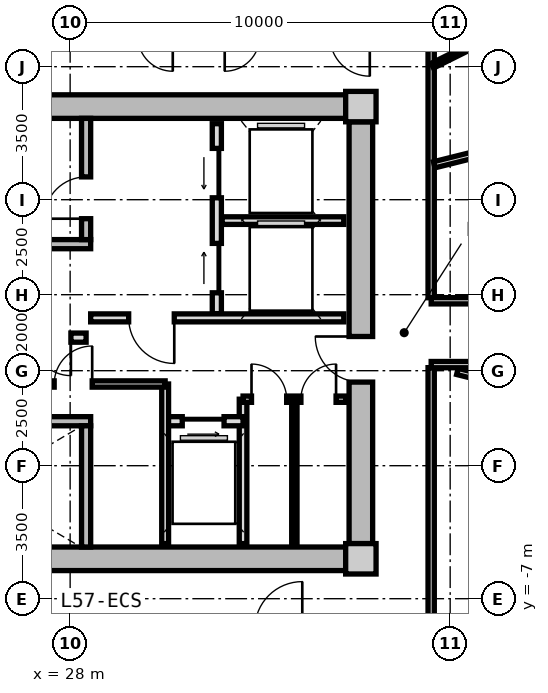
"""IFC4 building model, lengths in metres.
Left out: names, types, materials, properties, quantities, classifications, styles, units other than length and angle.
Written with IfcOpenShell. Run it as: python <this file> out.ifc"""

import sys

from ifc_helpers import new_model, si_unit, direction, frame, frame_2d, origin, origin_2d, place, context, subcontext, project, spatial, rectangle, extrude, source, transform, mapped, element, fill, save


model = new_model("IFC4")
c1 = context("Model", 3, precision=1e-05, world=origin(), true_north=direction((0.0, 1.0)))
c2 = subcontext(c1, "Body", "Model", "MODEL_VIEW")
j1 = project(units=[si_unit("LENGTHUNIT", "METRE"), si_unit("PLANEANGLEUNIT", "RADIAN")], contexts=[c1])
p1 = place(None, origin())
s1 = spatial("IfcSite", under=j1, at=p1, CompositionType="ELEMENT")
p2 = place(p1, origin())
s2 = spatial("IfcBuilding", under=s1, at=p2, CompositionType="ELEMENT")
p3 = place(p2, frame((0.0, 0.0, 183.1)))
s3 = spatial("IfcBuildingStorey", under=s2, at=p3, CompositionType="ELEMENT", Elevation=183.1)
m1 = source(origin(), c2, "Body", "SweptSolid", [
    extrude(rectangle(XDim=0.8, YDim=0.8, at=origin_2d()), origin(), (0.0, 0.0, 1.0), 3.05),
])
for number, where, z_axis, x_axis in (
    (1, (35.65, -5.95, 0.0), (0.0, 0.0, 1.0), (1.0, 0.0, 0.0)),
    (2, (35.65, 5.95, 0.0), (0.0, 0.0, 1.0), (1.0, 0.0, 0.0)),
):
    element("IfcColumn", number, at=place(p3, frame(where, z_axis=z_axis, x_axis=x_axis)), inside=s3, PredefinedType="COLUMN", context=c2, shape_type="MappedRepresentation", body=[
        mapped(m1, transform((0.0, 0.0, 0.0), x_axis=(1.0, 0.0, 0.0), y_axis=(0.0, 1.0, 0.0), z_axis=(0.0, 0.0, 1.0), scale=1.0)),
    ])
m2 = source(origin(), c2, "Body", "SweptSolid", [
    extrude(rectangle(XDim=14.5, YDim=0.62, at=frame_2d((7.25, 0.0))), origin(), (0.0, 0.0, 1.0), 2.73),
])
for number, where, z_axis, x_axis in (
    (3, (20.75, 5.95, 0.0), (0.0, 0.0, 1.0), (1.0, 0.0, 0.0)),
    (4, (35.25, -5.95, 0.0), (0.0, 0.0, 1.0), (-1.0, 0.0, 0.0)),
):
    element("IfcWall", number, at=place(p3, frame(where, z_axis=z_axis, x_axis=x_axis)), inside=s3, PredefinedType="SHEAR", context=c2, shape_type="MappedRepresentation", body=[
        mapped(m2, transform((0.0, 0.0, 0.0), x_axis=(1.0, 0.0, 0.0), y_axis=(0.0, 1.0, 0.0), z_axis=(0.0, 0.0, 1.0), scale=1.0)),
    ])
m3 = source(origin(), c2, "Body", "SweptSolid", [
    extrude(rectangle(XDim=11.1, YDim=0.62, at=frame_2d((5.55, 0.0))), origin(), (0.0, 0.0, 1.0), 2.73),
])
p4 = place(p3, frame((35.65, 5.55, 0.0), z_axis=(0.0, 0.0, 1.0), x_axis=(0.0, -1.0, 0.0)))
e5 = element("IfcWall", 5, at=p4, inside=s3, PredefinedType="SHEAR", context=c2, shape_type="MappedRepresentation", body=[
    mapped(m3, transform((0.0, 0.0, 0.0), x_axis=(1.0, 0.0, 0.0), y_axis=(0.0, 1.0, 0.0), z_axis=(0.0, 0.0, 1.0), scale=1.0)),
])
p5 = place(p4, frame((5.65, 0.0, 0.0)))
e6 = element("IfcOpeningElement", 6, at=p5, cuts=e5, PredefinedType="OPENING", context=c2, shape_type="SweptSolid", body=[
    extrude(rectangle(XDim=1.2, YDim=2.15, at=frame_2d((0.6, 1.075))), frame((0.0, 0.32, 0.0), z_axis=(0.0, -1.0, 0.0), x_axis=(1.0, 0.0, 0.0)), (0.0, 0.0, 1.0), 0.64),
])
m4 = source(origin(), c2, "Body", "SweptSolid", [
    extrude(rectangle(XDim=7.88, YDim=0.24, at=frame_2d((3.94, 0.0))), origin(), (0.0, 0.0, 1.0), 2.73),
])
p6 = place(p3, frame((20.66, 2.33, 0.0), z_axis=(0.0, 0.0, 1.0), x_axis=(1.0, 0.0, 0.0)))
e7 = element("IfcWall", 7, at=p6, inside=s3, PredefinedType="PARTITIONING", context=c2, shape_type="MappedRepresentation", body=[
    mapped(m4, transform((0.0, 0.0, 0.0), x_axis=(1.0, 0.0, 0.0), y_axis=(0.0, 1.0, 0.0), z_axis=(0.0, 0.0, 1.0), scale=1.0)),
])
m5 = source(origin(), c2, "Body", "SweptSolid", [
    extrude(rectangle(XDim=3.19, YDim=0.24, at=frame_2d((1.595, 0.0))), origin(), (0.0, 0.0, 1.0), 2.73),
])
p7 = place(p3, frame((28.42, 2.45, 0.0), z_axis=(0.0, 0.0, 1.0), x_axis=(0.0, 1.0, 0.0)))
e8 = element("IfcWall", 8, at=p7, inside=s3, PredefinedType="PARTITIONING", context=c2, shape_type="MappedRepresentation", body=[
    mapped(m5, transform((0.0, 0.0, 0.0), x_axis=(1.0, 0.0, 0.0), y_axis=(0.0, 1.0, 0.0), z_axis=(0.0, 0.0, 1.0), scale=1.0)),
])
p8 = place(p7, frame((0.55, 0.0, 0.0)))
e9 = element("IfcOpeningElement", 9, at=p8, cuts=e8, PredefinedType="OPENING", context=c2, shape_type="SweptSolid", body=[
    extrude(rectangle(XDim=1.1, YDim=2.15, at=frame_2d((0.55, 1.075))), frame((0.0, 0.13, 0.0), z_axis=(0.0, -1.0, 0.0), x_axis=(1.0, 0.0, 0.0)), (0.0, 0.0, 1.0), 0.26),
])
p9 = place(p3, frame((20.66, -2.33, 0.0), z_axis=(0.0, 0.0, 1.0), x_axis=(1.0, 0.0, 0.0)))
e10 = element("IfcWall", 10, at=p9, inside=s3, PredefinedType="PARTITIONING", context=c2, shape_type="MappedRepresentation", body=[
    mapped(m4, transform((0.0, 0.0, 0.0), x_axis=(1.0, 0.0, 0.0), y_axis=(0.0, 1.0, 0.0), z_axis=(0.0, 0.0, 1.0), scale=1.0)),
])
p10 = place(p9, frame((1.0, 0.0, 0.0)))
e11 = element("IfcOpeningElement", 11, at=p10, cuts=e10, PredefinedType="OPENING", context=c2, shape_type="SweptSolid", body=[
    extrude(rectangle(XDim=1.1, YDim=2.15, at=frame_2d((0.55, 1.075))), frame((0.0, 0.13, 0.0), z_axis=(0.0, -1.0, 0.0), x_axis=(1.0, 0.0, 0.0)), (0.0, 0.0, 1.0), 0.26),
])
p11 = place(p3, frame((28.42, -5.64, 0.0), z_axis=(0.0, 0.0, 1.0), x_axis=(0.0, 1.0, 0.0)))
e12 = element("IfcWall", 12, at=p11, inside=s3, PredefinedType="PARTITIONING", context=c2, shape_type="MappedRepresentation", body=[
    mapped(m5, transform((0.0, 0.0, 0.0), x_axis=(1.0, 0.0, 0.0), y_axis=(0.0, 1.0, 0.0), z_axis=(0.0, 0.0, 1.0), scale=1.0)),
])
m6 = source(origin(), c2, "Body", "SweptSolid", [
    extrude(rectangle(XDim=5.0, YDim=0.24, at=frame_2d((2.5, 0.0))), origin(), (0.0, 0.0, 1.0), 2.715),
])
p12 = place(p3, frame((31.86, 0.5, 0.0), z_axis=(0.0, 0.0, 1.0), x_axis=(0.0, 1.0, 0.0)))
e13 = element("IfcWall", 13, at=p12, inside=s3, PredefinedType="PARTITIONING", context=c2, shape_type="MappedRepresentation", body=[
    mapped(m6, transform((0.0, 0.0, 0.0), x_axis=(1.0, 0.0, 0.0), y_axis=(0.0, 1.0, 0.0), z_axis=(0.0, 0.0, 1.0), scale=1.0)),
])
p13 = place(p12, frame((3.05, 0.0, 0.0)))
e14 = element("IfcOpeningElement", 14, at=p13, cuts=e13, PredefinedType="OPENING", context=c2, shape_type="SweptSolid", body=[
    extrude(rectangle(XDim=1.3, YDim=2.2, at=frame_2d((0.65, 1.1))), frame((0.0, 0.13, 0.0), z_axis=(0.0, -1.0, 0.0), x_axis=(1.0, 0.0, 0.0)), (0.0, 0.0, 1.0), 0.26),
])
p14 = place(p12, frame((0.55, 0.0, 0.0)))
e15 = element("IfcOpeningElement", 15, at=p14, cuts=e13, PredefinedType="OPENING", context=c2, shape_type="SweptSolid", body=[
    extrude(rectangle(XDim=1.3, YDim=2.2, at=frame_2d((0.65, 1.1))), frame((0.0, 0.13, 0.0), z_axis=(0.0, -1.0, 0.0), x_axis=(1.0, 0.0, 0.0)), (0.0, 0.0, 1.0), 0.26),
])
m7 = source(origin(), c2, "Body", "SweptSolid", [
    extrude(rectangle(XDim=3.2, YDim=0.2, at=frame_2d((1.6, 0.0))), origin(), (0.0, 0.0, 1.0), 2.715),
])
p15 = place(p3, frame((32.0, 2.95, 0.0), z_axis=(0.0, 0.0, 1.0), x_axis=(1.0, 0.0, 0.0)))
e16 = element("IfcWall", 16, at=p15, inside=s3, PredefinedType="PARTITIONING", context=c2, shape_type="MappedRepresentation", body=[
    mapped(m7, transform((0.0, 0.0, 0.0), x_axis=(1.0, 0.0, 0.0), y_axis=(0.0, 1.0, 0.0), z_axis=(0.0, 0.0, 1.0), scale=1.0)),
])
m8 = source(origin(), c2, "Body", "SweptSolid", [
    extrude(rectangle(XDim=6.66, YDim=0.21, at=frame_2d((3.33, 0.0))), origin(), (0.0, 0.0, 1.0), 2.715),
])
p16 = place(p3, frame((28.54, 0.39, 0.0), z_axis=(0.0, 0.0, 1.0), x_axis=(1.0, 0.0, 0.0)))
e17 = element("IfcWall", 17, at=p16, inside=s3, PredefinedType="PARTITIONING", context=c2, shape_type="MappedRepresentation", body=[
    mapped(m8, transform((0.0, 0.0, 0.0), x_axis=(1.0, 0.0, 0.0), y_axis=(0.0, 1.0, 0.0), z_axis=(0.0, 0.0, 1.0), scale=1.0)),
])
p17 = place(p16, frame((1.0, 0.0, 0.0)))
e18 = element("IfcOpeningElement", 18, at=p17, cuts=e17, PredefinedType="OPENING", context=c2, shape_type="SweptSolid", body=[
    extrude(rectangle(XDim=1.2, YDim=2.15, at=frame_2d((0.6, 1.075))), frame((0.0, 0.115, 0.0), z_axis=(0.0, -1.0, 0.0), x_axis=(1.0, 0.0, 0.0)), (0.0, 0.0, 1.0), 0.23),
])
m9 = source(origin(), c2, "Body", "SweptSolid", [
    extrude(rectangle(XDim=7.62, YDim=0.24, at=frame_2d((3.81, 0.0))), origin(), (0.0, 0.0, 1.0), 2.715),
])
p18 = place(p3, frame((20.8, -0.13, 0.0), z_axis=(0.0, 0.0, 1.0), x_axis=(1.0, 0.0, 0.0)))
e19 = element("IfcWall", 19, at=p18, inside=s3, PredefinedType="PARTITIONING", context=c2, shape_type="MappedRepresentation", body=[
    mapped(m9, transform((0.0, 0.0, 0.0), x_axis=(1.0, 0.0, 0.0), y_axis=(0.0, 1.0, 0.0), z_axis=(0.0, 0.0, 1.0), scale=1.0)),
])
p19 = place(p18, frame((6.22, 0.0, 0.0)))
e20 = element("IfcOpeningElement", 20, at=p19, cuts=e19, PredefinedType="OPENING", context=c2, shape_type="SweptSolid", body=[
    extrude(rectangle(XDim=1.0, YDim=2.1, at=frame_2d((0.5, 1.05))), frame((0.0, 0.13, 0.0), z_axis=(0.0, -1.0, 0.0), x_axis=(1.0, 0.0, 0.0)), (0.0, 0.0, 1.0), 0.26),
])
p20 = place(p18, frame((2.4, 0.0, 0.0)))
e21 = element("IfcOpeningElement", 21, at=p20, cuts=e19, PredefinedType="OPENING", context=c2, shape_type="SweptSolid", body=[
    extrude(rectangle(XDim=1.0, YDim=2.1, at=frame_2d((0.5, 1.05))), frame((0.0, 0.13, 0.0), z_axis=(0.0, -1.0, 0.0), x_axis=(1.0, 0.0, 0.0)), (0.0, 0.0, 1.0), 0.26),
])
m10 = source(origin(), c2, "Body", "SweptSolid", [
    extrude(rectangle(XDim=3.8, YDim=0.2, at=frame_2d((1.9, 0.0))), origin(), (0.0, 0.0, 1.0), 2.715),
])
p21 = place(p3, frame((32.55, -5.55, 0.0), z_axis=(0.0, 0.0, 1.0), x_axis=(0.0, 1.0, 0.0)))
e22 = element("IfcWall", 22, at=p21, inside=s3, PredefinedType="PARTITIONING", context=c2, shape_type="MappedRepresentation", body=[
    mapped(m10, transform((0.0, 0.0, 0.0), x_axis=(1.0, 0.0, 0.0), y_axis=(0.0, 1.0, 0.0), z_axis=(0.0, 0.0, 1.0), scale=1.0)),
])
m11 = source(origin(), c2, "Body", "SweptSolid", [
    extrude(rectangle(XDim=2.05, YDim=0.24, at=frame_2d((1.025, 0.0))), origin(), (0.0, 0.0, 1.0), 2.715),
])
p22 = place(p3, frame((30.5, -2.33, 0.0), z_axis=(0.0, 0.0, 1.0), x_axis=(1.0, 0.0, 0.0)))
e23 = element("IfcWall", 23, at=p22, inside=s3, PredefinedType="PARTITIONING", context=c2, shape_type="MappedRepresentation", body=[
    mapped(m11, transform((0.0, 0.0, 0.0), x_axis=(1.0, 0.0, 0.0), y_axis=(0.0, 1.0, 0.0), z_axis=(0.0, 0.0, 1.0), scale=1.0)),
])
p23 = place(p22, frame((0.45, 0.0, 0.0)))
e24 = element("IfcOpeningElement", 24, at=p23, cuts=e23, PredefinedType="OPENING", context=c2, shape_type="SweptSolid", body=[
    extrude(rectangle(XDim=1.1, YDim=2.2, at=frame_2d((0.55, 1.1))), frame((0.0, 0.13, 0.0), z_axis=(0.0, -1.0, 0.0), x_axis=(1.0, 0.0, 0.0)), (0.0, 0.0, 1.0), 0.26),
])
m12 = source(origin(), c2, "Body", "SweptSolid", [
    extrude(rectangle(XDim=4.2, YDim=0.18, at=frame_2d((2.1, 0.0))), origin(), (0.0, 0.0, 1.0), 2.715),
])
p24 = place(p3, frame((30.5, -5.55, 0.0), z_axis=(0.0, 0.0, 1.0), x_axis=(0.0, 1.0, 0.0)))
e25 = element("IfcWall", 25, at=p24, inside=s3, PredefinedType="PARTITIONING", context=c2, shape_type="MappedRepresentation", body=[
    mapped(m12, transform((0.0, 0.0, 0.0), x_axis=(1.0, 0.0, 0.0), y_axis=(0.0, 1.0, 0.0), z_axis=(0.0, 0.0, 1.0), scale=1.0)),
])
m13 = source(origin(), c2, "Body", "SweptSolid", [
    extrude(rectangle(XDim=4.77, YDim=0.165, at=frame_2d((2.385, 0.0))), origin(), (0.0, 0.0, 1.0), 2.715),
])
p25 = place(p3, frame((25.73, -1.35, 0.0), z_axis=(0.0, 0.0, 1.0), x_axis=(1.0, 0.0, 0.0)))
e26 = element("IfcWall", 26, at=p25, inside=s3, PredefinedType="PARTITIONING", context=c2, shape_type="MappedRepresentation", body=[
    mapped(m13, transform((0.0, 0.0, 0.0), x_axis=(1.0, 0.0, 0.0), y_axis=(0.0, 1.0, 0.0), z_axis=(0.0, 0.0, 1.0), scale=1.0)),
])
p26 = place(p25, frame((1.85, 0.0, 0.0)))
e27 = element("IfcOpeningElement", 27, at=p26, cuts=e26, PredefinedType="OPENING", context=c2, shape_type="SweptSolid", body=[
    extrude(rectangle(XDim=1.0, YDim=2.1, at=frame_2d((0.5, 1.05))), frame((0.0, 0.093, 0.0), z_axis=(0.0, -1.0, 0.0), x_axis=(1.0, 0.0, 0.0)), (0.0, 0.0, 1.0), 0.185),
])
m14 = source(origin(), c2, "Body", "SweptSolid", [
    extrude(rectangle(XDim=2.7, YDim=0.165, at=frame_2d((1.35, 0.0))), origin(), (0.0, 0.0, 1.0), 2.715),
])
p27 = place(p3, frame((32.55, -1.75, 0.0), z_axis=(0.0, 0.0, 1.0), x_axis=(1.0, 0.0, 0.0)))
e28 = element("IfcWall", 28, at=p27, inside=s3, PredefinedType="PARTITIONING", context=c2, shape_type="MappedRepresentation", body=[
    mapped(m14, transform((0.0, 0.0, 0.0), x_axis=(1.0, 0.0, 0.0), y_axis=(0.0, 1.0, 0.0), z_axis=(0.0, 0.0, 1.0), scale=1.0)),
])
p28 = place(p27, frame((0.222, 0.0, 0.0)))
e29 = element("IfcOpeningElement", 29, at=p28, cuts=e28, PredefinedType="OPENING", context=c2, shape_type="SweptSolid", body=[
    extrude(rectangle(XDim=0.925, YDim=2.1, at=frame_2d((0.462, 1.05))), frame((0.0, 0.093, 0.0), z_axis=(0.0, -1.0, 0.0), x_axis=(1.0, 0.0, 0.0)), (0.0, 0.0, 1.0), 0.185),
])
p29 = place(p27, frame((1.522, 0.0, 0.0)))
e30 = element("IfcOpeningElement", 30, at=p29, cuts=e28, PredefinedType="OPENING", context=c2, shape_type="SweptSolid", body=[
    extrude(rectangle(XDim=0.925, YDim=2.1, at=frame_2d((0.462, 1.05))), frame((0.0, 0.093, 0.0), z_axis=(0.0, -1.0, 0.0), x_axis=(1.0, 0.0, 0.0)), (0.0, 0.0, 1.0), 0.185),
])
m15 = source(origin(), c2, "Body", "SweptSolid", [
    extrude(rectangle(XDim=3.8, YDim=0.14, at=frame_2d((1.9, 0.0))), origin(), (0.0, 0.0, 1.0), 2.715),
])
p30 = place(p3, frame((33.9, -5.55, 0.0), z_axis=(0.0, 0.0, 1.0), x_axis=(0.0, 1.0, 0.0)))
e31 = element("IfcWall", 31, at=p30, inside=s3, PredefinedType="PARTITIONING", context=c2, shape_type="MappedRepresentation", body=[
    mapped(m15, transform((0.0, 0.0, 0.0), x_axis=(1.0, 0.0, 0.0), y_axis=(0.0, 1.0, 0.0), z_axis=(0.0, 0.0, 1.0), scale=1.0)),
])
m16 = source(origin(), c2, "Body", "SweptSolid", [
    extrude(rectangle(XDim=6.88, YDim=0.165, at=frame_2d((3.44, 0.0))), origin(), (0.0, 0.0, 1.0), 2.715),
])
for number, where, z_axis, x_axis in (
    (32, (37.5, 7.8, 0.0), (0.0, 0.0, 1.0), (0.0, -1.0, 0.0)),
    (33, (37.5, -0.92, 0.0), (0.0, 0.0, 1.0), (0.0, -1.0, 0.0)),
):
    element("IfcWall", number, at=place(p3, frame(where, z_axis=z_axis, x_axis=x_axis)), inside=s3, PredefinedType="PARTITIONING", context=c2, shape_type="MappedRepresentation", body=[
        mapped(m16, transform((0.0, 0.0, 0.0), x_axis=(1.0, 0.0, 0.0), y_axis=(0.0, 1.0, 0.0), z_axis=(0.0, 0.0, 1.0), scale=1.0)),
    ])
m17 = source(origin(), c2, "Body", "SweptSolid", [
    extrude(rectangle(XDim=5.564, YDim=0.165, at=frame_2d((2.782, 0.0))), origin(), (0.0, 0.0, 1.0), 2.265),
])
p31 = place(p3, frame((38.19, -1.02, 0.0), z_axis=(0.0, 0.0, 1.0), x_axis=(0.97031260977, -0.241854169533, 0.0)))
e34 = element("IfcWall", 34, at=p31, inside=s3, PredefinedType="PARTITIONING", context=c2, shape_type="MappedRepresentation", body=[
    mapped(m17, transform((0.0, 0.0, 0.0), x_axis=(1.0, 0.0, 0.0), y_axis=(0.0, 1.0, 0.0), z_axis=(0.0, 0.0, 1.0), scale=1.0)),
])
m18 = source(origin(), c2, "Body", "SweptSolid", [
    extrude(rectangle(XDim=6.193, YDim=0.165, at=frame_2d((3.096, 0.0))), origin(), (0.0, 0.0, 1.0), 2.265),
])
p32 = place(p3, frame((37.58, 4.419, 0.0), z_axis=(0.0, 0.0, 1.0), x_axis=(0.970309243466, 0.241867674657, 0.0)))
e35 = element("IfcWall", 35, at=p32, inside=s3, PredefinedType="PARTITIONING", context=c2, shape_type="MappedRepresentation", body=[
    mapped(m18, transform((0.0, 0.0, 0.0), x_axis=(1.0, 0.0, 0.0), y_axis=(0.0, 1.0, 0.0), z_axis=(0.0, 0.0, 1.0), scale=1.0)),
])
m19 = source(origin(), c2, "Body", "SweptSolid", [
    extrude(rectangle(XDim=6.139, YDim=0.165, at=frame_2d((3.069, 0.0))), origin(), (0.0, 0.0, 1.0), 2.715),
])
p33 = place(p3, frame((37.5, 0.84, 0.0), z_axis=(0.0, 0.0, 1.0), x_axis=(1.0, 0.0, 0.0)))
e36 = element("IfcWall", 36, at=p33, inside=s3, PredefinedType="PARTITIONING", context=c2, shape_type="MappedRepresentation", body=[
    mapped(m19, transform((0.0, 0.0, 0.0), x_axis=(1.0, 0.0, 0.0), y_axis=(0.0, 1.0, 0.0), z_axis=(0.0, 0.0, 1.0), scale=1.0)),
])
p34 = place(p33, frame((2.594, 0.0, 0.0)))
e37 = element("IfcOpeningElement", 37, at=p34, cuts=e36, PredefinedType="OPENING", context=c2, shape_type="SweptSolid", body=[
    extrude(rectangle(XDim=0.95, YDim=2.1, at=frame_2d((0.475, 1.05))), frame((0.0, 0.093, 0.0), z_axis=(0.0, -1.0, 0.0), x_axis=(1.0, 0.0, 0.0)), (0.0, 0.0, 1.0), 0.185),
])
p35 = place(p3, frame((43.639, -0.84, 0.0), z_axis=(0.0, 0.0, 1.0), x_axis=(-1.0, 0.0, 0.0)))
e38 = element("IfcWall", 38, at=p35, inside=s3, PredefinedType="PARTITIONING", context=c2, shape_type="MappedRepresentation", body=[
    mapped(m19, transform((0.0, 0.0, 0.0), x_axis=(1.0, 0.0, 0.0), y_axis=(0.0, 1.0, 0.0), z_axis=(0.0, 0.0, 1.0), scale=1.0)),
])
m20 = source(origin(), c2, "Body", "SweptSolid", [
    extrude(rectangle(XDim=2.471, YDim=0.14, at=frame_2d((1.235, 0.0))), origin(), (0.0, 0.0, 1.0), 2.715),
])
p36 = place(p3, frame((37.53, 7.026, 0.0), z_axis=(0.0, 0.0, 1.0), x_axis=(0.895295102372, 0.445473545419, 0.0)))
e39 = element("IfcWall", 39, at=p36, inside=s3, PredefinedType="PARTITIONING", context=c2, shape_type="MappedRepresentation", body=[
    mapped(m20, transform((0.0, 0.0, 0.0), x_axis=(1.0, 0.0, 0.0), y_axis=(0.0, 1.0, 0.0), z_axis=(0.0, 0.0, 1.0), scale=1.0)),
])
m21 = source(origin(), c2, "Body", "SweptSolid", [
    extrude(rectangle(XDim=1.1, YDim=2.15, at=frame_2d((0.55, 1.075))), frame((0.0, 0.025, 0.0), z_axis=(0.0, -1.0, 0.0), x_axis=(1.0, 0.0, 0.0)), (0.0, 0.0, 1.0), 0.05),
])
p37 = place(p8, origin())
e40 = element("IfcDoor", 40, at=p37, inside=s3, OperationType="SINGLE_SWING_LEFT", PredefinedType="DOOR", context=c2, shape_type="MappedRepresentation", body=[
    mapped(m21, transform((0.0, 0.0, 0.0), x_axis=(1.0, 0.0, 0.0), y_axis=(0.0, 1.0, 0.0), z_axis=(0.0, 0.0, 1.0), scale=1.0)),
])
fill(e9, e40)
m22 = source(origin(), c2, "Body", "SweptSolid", [
    extrude(rectangle(XDim=1.3, YDim=2.2, at=frame_2d((0.65, 1.1))), frame((0.0, 0.025, 0.0), z_axis=(0.0, -1.0, 0.0), x_axis=(1.0, 0.0, 0.0)), (0.0, 0.0, 1.0), 0.05),
])
p38 = place(p13, origin())
e41 = element("IfcDoor", 41, at=p38, inside=s3, OperationType="SLIDING_TO_LEFT", PredefinedType="DOOR", context=c2, shape_type="MappedRepresentation", body=[
    mapped(m22, transform((0.0, 0.0, 0.0), x_axis=(1.0, 0.0, 0.0), y_axis=(0.0, 1.0, 0.0), z_axis=(0.0, 0.0, 1.0), scale=1.0)),
])
fill(e14, e41)
p39 = place(p14, origin())
e42 = element("IfcDoor", 42, at=p39, inside=s3, OperationType="SLIDING_TO_RIGHT", PredefinedType="DOOR", context=c2, shape_type="MappedRepresentation", body=[
    mapped(m22, transform((0.0, 0.0, 0.0), x_axis=(1.0, 0.0, 0.0), y_axis=(0.0, 1.0, 0.0), z_axis=(0.0, 0.0, 1.0), scale=1.0)),
])
fill(e15, e42)
m23 = source(origin(), c2, "Body", "SweptSolid", [
    extrude(rectangle(XDim=1.2, YDim=2.15, at=frame_2d((0.6, 1.075))), frame((0.0, 0.025, 0.0), z_axis=(0.0, -1.0, 0.0), x_axis=(1.0, 0.0, 0.0)), (0.0, 0.0, 1.0), 0.05),
])
p40 = place(p17, frame((1.2, 0.0, 0.0), z_axis=(0.0, 0.0, 1.0), x_axis=(-1.0, 0.0, 0.0)))
e43 = element("IfcDoor", 43, at=p40, inside=s3, OperationType="SINGLE_SWING_LEFT", PredefinedType="DOOR", context=c2, shape_type="MappedRepresentation", body=[
    mapped(m23, transform((0.0, 0.0, 0.0), x_axis=(1.0, 0.0, 0.0), y_axis=(0.0, 1.0, 0.0), z_axis=(0.0, 0.0, 1.0), scale=1.0)),
])
fill(e18, e43)
p41 = place(p5, frame((1.2, 0.0, 0.0), z_axis=(0.0, 0.0, 1.0), x_axis=(-1.0, 0.0, 0.0)))
e44 = element("IfcDoor", 44, at=p41, inside=s3, OperationType="SINGLE_SWING_RIGHT", PredefinedType="DOOR", context=c2, shape_type="MappedRepresentation", body=[
    mapped(m23, transform((0.0, 0.0, 0.0), x_axis=(1.0, 0.0, 0.0), y_axis=(0.0, 1.0, 0.0), z_axis=(0.0, 0.0, 1.0), scale=1.0)),
])
fill(e6, e44)
m24 = source(origin(), c2, "Body", "SweptSolid", [
    extrude(rectangle(XDim=1.0, YDim=2.1, at=frame_2d((0.5, 1.05))), frame((0.0, 0.025, 0.0), z_axis=(0.0, -1.0, 0.0), x_axis=(1.0, 0.0, 0.0)), (0.0, 0.0, 1.0), 0.05),
])
p42 = place(p19, frame((1.0, 0.0, 0.0), z_axis=(0.0, 0.0, 1.0), x_axis=(-1.0, 0.0, 0.0)))
e45 = element("IfcDoor", 45, at=p42, inside=s3, OperationType="SINGLE_SWING_LEFT", PredefinedType="DOOR", context=c2, shape_type="MappedRepresentation", body=[
    mapped(m24, transform((0.0, 0.0, 0.0), x_axis=(1.0, 0.0, 0.0), y_axis=(0.0, 1.0, 0.0), z_axis=(0.0, 0.0, 1.0), scale=1.0)),
])
fill(e20, e45)
m25 = source(origin(), c2, "Body", "SweptSolid", [
    extrude(rectangle(XDim=1.1, YDim=2.2, at=frame_2d((0.55, 1.1))), frame((0.0, 0.025, 0.0), z_axis=(0.0, -1.0, 0.0), x_axis=(1.0, 0.0, 0.0)), (0.0, 0.0, 1.0), 0.05),
])
p43 = place(p23, frame((1.1, 0.0, 0.0), z_axis=(0.0, 0.0, 1.0), x_axis=(-1.0, 0.0, 0.0)))
e46 = element("IfcDoor", 46, at=p43, inside=s3, OperationType="SLIDING_TO_RIGHT", PredefinedType="DOOR", context=c2, shape_type="MappedRepresentation", body=[
    mapped(m25, transform((0.0, 0.0, 0.0), x_axis=(1.0, 0.0, 0.0), y_axis=(0.0, 1.0, 0.0), z_axis=(0.0, 0.0, 1.0), scale=1.0)),
])
fill(e24, e46)
p44 = place(p26, origin())
e47 = element("IfcDoor", 47, at=p44, inside=s3, OperationType="SINGLE_SWING_RIGHT", PredefinedType="DOOR", context=c2, shape_type="MappedRepresentation", body=[
    mapped(m24, transform((0.0, 0.0, 0.0), x_axis=(1.0, 0.0, 0.0), y_axis=(0.0, 1.0, 0.0), z_axis=(0.0, 0.0, 1.0), scale=1.0)),
])
fill(e27, e47)
m26 = source(origin(), c2, "Body", "SweptSolid", [
    extrude(rectangle(XDim=0.925, YDim=2.1, at=frame_2d((0.462, 1.05))), frame((0.0, 0.025, 0.0), z_axis=(0.0, -1.0, 0.0), x_axis=(1.0, 0.0, 0.0)), (0.0, 0.0, 1.0), 0.05),
])
p45 = place(p28, origin())
e48 = element("IfcDoor", 48, at=p45, inside=s3, OperationType="SINGLE_SWING_LEFT", PredefinedType="DOOR", context=c2, shape_type="MappedRepresentation", body=[
    mapped(m26, transform((0.0, 0.0, 0.0), x_axis=(1.0, 0.0, 0.0), y_axis=(0.0, 1.0, 0.0), z_axis=(0.0, 0.0, 1.0), scale=1.0)),
])
fill(e29, e48)
p46 = place(p29, origin())
e49 = element("IfcDoor", 49, at=p46, inside=s3, OperationType="SINGLE_SWING_RIGHT", PredefinedType="DOOR", context=c2, shape_type="MappedRepresentation", body=[
    mapped(m26, transform((0.0, 0.0, 0.0), x_axis=(1.0, 0.0, 0.0), y_axis=(0.0, 1.0, 0.0), z_axis=(0.0, 0.0, 1.0), scale=1.0)),
])
fill(e30, e49)
save(model, sys.argv[1])
